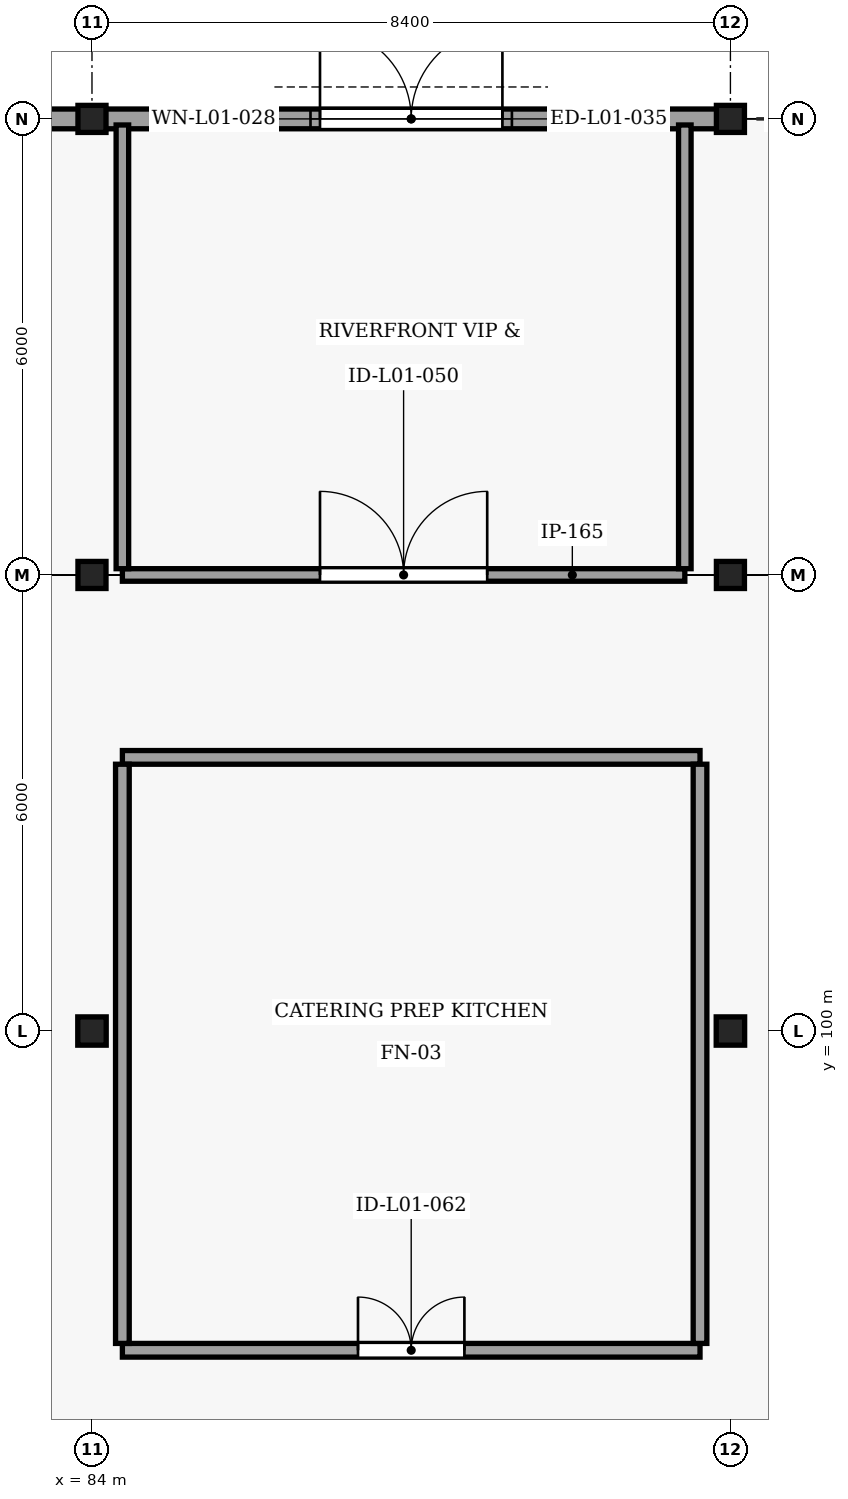
"""IFC4 building model, lengths in metres.
Left out: names, types, materials, properties, quantities, classifications, styles, units other than length and angle.
Written with IfcOpenShell. Run it as: python <this file> out.ifc"""

import sys

from ifc_helpers import new_model, si_unit, direction, frame, frame_2d, origin, origin_2d, place, context, subcontext, project, spatial, rectangle, i_section, extrude, element, fill, save


model = new_model("IFC4")
c1 = context("Model", 3, precision=1e-05, world=origin(), true_north=direction((0.0, 1.0)))
c2 = subcontext(c1, "Body", "Model", "MODEL_VIEW")
j1 = project(units=[si_unit("LENGTHUNIT", "METRE"), si_unit("PLANEANGLEUNIT", "RADIAN")], contexts=[c1])
p1 = place(None, origin())
s1 = spatial("IfcSite", under=j1, at=p1, CompositionType="ELEMENT")
p2 = place(p1, origin())
s2 = spatial("IfcBuilding", under=s1, at=p2, CompositionType="ELEMENT")
p3 = place(p2, origin())
s3 = spatial("IfcBuildingStorey", under=s2, at=p3, CompositionType="ELEMENT", Elevation=0.0)
for number, where, z_axis, x_axis in (
    (1, (84.0, 100.0, -0.45), (0.0, 0.0, 1.0), (1.0, 0.0, 0.0)),
    (2, (92.4, 100.0, -0.45), (0.0, 0.0, 1.0), (1.0, 0.0, 0.0)),
):
    element("IfcColumn", number, at=place(p3, frame(where, z_axis=z_axis, x_axis=x_axis)), inside=s3, PredefinedType="COLUMN", context=c2, shape_type="SweptSolid", body=[
        extrude(i_section(OverallWidth=0.374, OverallDepth=0.372, WebThickness=0.016, FlangeThickness=0.026, FilletRadius=0.016, at=origin_2d()), origin(), (0.0, 0.0, 1.0), 5.57),
    ])
for number, where, z_axis, x_axis in (
    (3, (84.0, 106.0, -0.45), (0.0, 0.0, 1.0), (1.0, 0.0, 0.0)),
    (4, (92.4, 106.0, -0.45), (0.0, 0.0, 1.0), (1.0, 0.0, 0.0)),
    (5, (84.0, 112.0, -0.45), (0.0, 0.0, 1.0), (1.0, 0.0, 0.0)),
    (6, (92.4, 112.0, -0.45), (0.0, 0.0, 1.0), (1.0, 0.0, 0.0)),
):
    element("IfcColumn", number, at=place(p3, frame(where, z_axis=z_axis, x_axis=x_axis)), inside=s3, PredefinedType="COLUMN", context=c2, shape_type="SweptSolid", body=[
        extrude(i_section(OverallWidth=0.369, OverallDepth=0.356, WebThickness=0.011, FlangeThickness=0.018, FilletRadius=0.015, at=origin_2d()), origin(), (0.0, 0.0, 1.0), 5.57),
    ])
p4 = place(p3, frame((74.163, 112.0, 0.0), z_axis=(0.0, 0.0, 1.0), x_axis=(1.0, 0.0, 0.0)))
e7 = element("IfcWall", 7, at=p4, inside=s3, PredefinedType="SOLIDWALL", context=c2, shape_type="SweptSolid", body=[
    extrude(rectangle(XDim=10.018, YDim=0.26, at=frame_2d((5.009, 0.0))), origin(), (0.0, 0.0, 1.0), 4.658),
])
p5 = place(p4, frame((3.637, 0.0, 0.0)))
e8 = element("IfcOpeningElement", 8, at=p5, cuts=e7, PredefinedType="OPENING", context=c2, shape_type="SweptSolid", body=[
    extrude(rectangle(XDim=2.4, YDim=2.4, at=frame_2d((1.2, 1.2))), frame((0.0, 0.14, 0.0), z_axis=(0.0, -1.0, 0.0), x_axis=(1.0, 0.0, 0.0)), (0.0, 0.0, 1.0), 0.28),
])
p6 = place(p4, frame((3.512, 0.0, 3.2)))
e9 = element("IfcOpeningElement", 9, at=p6, cuts=e7, PredefinedType="OPENING", context=c2, shape_type="SweptSolid", body=[
    extrude(rectangle(XDim=2.65, YDim=0.92, at=frame_2d((1.325, 0.46))), frame((0.0, 0.14, 0.0), z_axis=(0.0, -1.0, 0.0), x_axis=(1.0, 0.0, 0.0)), (0.0, 0.0, 1.0), 0.28),
])
p7 = place(p3, frame((84.169, 112.0, 0.0), z_axis=(0.0, 0.0, 1.0), x_axis=(1.0, 0.0, 0.0)))
e10 = element("IfcWall", 10, at=p7, inside=s3, PredefinedType="SOLIDWALL", context=c2, shape_type="SweptSolid", body=[
    extrude(rectangle(XDim=8.061, YDim=0.26, at=frame_2d((4.031, 0.0))), origin(), (0.0, 0.0, 1.0), 4.658),
])
p8 = place(p7, frame((2.831, 0.0, 0.0)))
e11 = element("IfcOpeningElement", 11, at=p8, cuts=e10, PredefinedType="OPENING", context=c2, shape_type="SweptSolid", body=[
    extrude(rectangle(XDim=2.4, YDim=2.4, at=frame_2d((1.2, 1.2))), frame((0.0, 0.14, 0.0), z_axis=(0.0, -1.0, 0.0), x_axis=(1.0, 0.0, 0.0)), (0.0, 0.0, 1.0), 0.28),
])
p9 = place(p7, frame((2.706, 0.0, 3.2)))
e12 = element("IfcOpeningElement", 12, at=p9, cuts=e10, PredefinedType="OPENING", context=c2, shape_type="SweptSolid", body=[
    extrude(rectangle(XDim=2.65, YDim=0.92, at=frame_2d((1.325, 0.46))), frame((0.0, 0.14, 0.0), z_axis=(0.0, -1.0, 0.0), x_axis=(1.0, 0.0, 0.0)), (0.0, 0.0, 1.0), 0.28),
])
p10 = place(p3, frame((84.4, 106.0, 0.0), z_axis=(0.0, 0.0, 1.0), x_axis=(1.0, 0.0, 0.0)))
e13 = element("IfcWall", 13, at=p10, inside=s3, PredefinedType="PARTITIONING", context=c2, shape_type="SweptSolid", body=[
    extrude(rectangle(XDim=7.4, YDim=0.165, at=frame_2d((3.7, 0.0))), origin(), (0.0, 0.0, 1.0), 4.66),
])
p11 = place(p10, frame((2.6, 0.0, 0.0)))
e14 = element("IfcOpeningElement", 14, at=p11, cuts=e13, PredefinedType="OPENING", context=c2, shape_type="SweptSolid", body=[
    extrude(rectangle(XDim=2.2, YDim=2.45, at=frame_2d((1.1, 1.225))), frame((0.0, 0.093, 0.0), z_axis=(0.0, -1.0, 0.0), x_axis=(1.0, 0.0, 0.0)), (0.0, 0.0, 1.0), 0.185),
])
for number, where, z_axis, x_axis in (
    (15, (84.4, 106.083, 0.0), (0.0, 0.0, 1.0), (0.0, 1.0, 0.0)),
    (16, (91.8, 106.083, 0.0), (0.0, 0.0, 1.0), (0.0, 1.0, 0.0)),
):
    element("IfcWall", number, at=place(p3, frame(where, z_axis=z_axis, x_axis=x_axis)), inside=s3, PredefinedType="PARTITIONING", context=c2, shape_type="SweptSolid", body=[
        extrude(rectangle(XDim=5.837, YDim=0.165, at=frame_2d((2.919, 0.0))), origin(), (0.0, 0.0, 1.0), 4.807),
    ])
p12 = place(p3, frame((84.4, 95.8, 0.0), z_axis=(0.0, 0.0, 1.0), x_axis=(1.0, 0.0, 0.0)))
e17 = element("IfcWall", 17, at=p12, inside=s3, PredefinedType="SOLIDWALL", context=c2, shape_type="SweptSolid", body=[
    extrude(rectangle(XDim=7.6, YDim=0.18, at=frame_2d((3.8, 0.0))), origin(), (0.0, 0.0, 1.0), 5.1),
])
p13 = place(p12, frame((3.1, 0.0, 0.0)))
e18 = element("IfcOpeningElement", 18, at=p13, cuts=e17, PredefinedType="OPENING", context=c2, shape_type="SweptSolid", body=[
    extrude(rectangle(XDim=1.4, YDim=2.2, at=frame_2d((0.7, 1.1))), frame((0.0, 0.1, 0.0), z_axis=(0.0, -1.0, 0.0), x_axis=(1.0, 0.0, 0.0)), (0.0, 0.0, 1.0), 0.2),
])
p14 = place(p3, frame((84.4, 103.6, 0.0), z_axis=(0.0, 0.0, 1.0), x_axis=(1.0, 0.0, 0.0)))
e19 = element("IfcWall", 19, at=p14, inside=s3, PredefinedType="SOLIDWALL", context=c2, shape_type="SweptSolid", body=[
    extrude(rectangle(XDim=7.6, YDim=0.18, at=frame_2d((3.8, 0.0))), origin(), (0.0, 0.0, 1.0), 5.1),
])
for number, where, z_axis, x_axis in (
    (20, (84.4, 95.89, 0.0), (0.0, 0.0, 1.0), (0.0, 1.0, 0.0)),
    (21, (92.0, 95.89, 0.0), (0.0, 0.0, 1.0), (0.0, 1.0, 0.0)),
):
    element("IfcWall", number, at=place(p3, frame(where, z_axis=z_axis, x_axis=x_axis)), inside=s3, PredefinedType="SOLIDWALL", context=c2, shape_type="SweptSolid", body=[
        extrude(rectangle(XDim=7.62, YDim=0.18, at=frame_2d((3.81, 0.0))), origin(), (0.0, 0.0, 1.0), 4.66),
    ])
p15 = place(p8, origin())
e22 = element("IfcDoor", 22, at=p15, inside=s3, OperationType="DOUBLE_DOOR_SINGLE_SWING", PredefinedType="DOOR", context=c2, shape_type="SweptSolid", body=[
    extrude(rectangle(XDim=2.4, YDim=2.4, at=frame_2d((1.2, 1.2))), frame((0.0, 0.025, 0.0), z_axis=(0.0, -1.0, 0.0), x_axis=(1.0, 0.0, 0.0)), (0.0, 0.0, 1.0), 0.05),
])
fill(e11, e22)
p16 = place(p9, origin())
e23 = element("IfcWindow", 23, at=p16, inside=s3, PartitioningType="SINGLE_PANEL", PredefinedType="WINDOW", context=c2, shape_type="SweptSolid", body=[
    extrude(rectangle(XDim=2.65, YDim=0.92, at=frame_2d((1.325, 0.46))), frame((0.0, 0.03, 0.0), z_axis=(0.0, -1.0, 0.0), x_axis=(1.0, 0.0, 0.0)), (0.0, 0.0, 1.0), 0.06),
])
fill(e12, e23)
p17 = place(p11, origin())
e24 = element("IfcDoor", 24, at=p17, inside=s3, OperationType="DOUBLE_DOOR_SINGLE_SWING", PredefinedType="DOOR", context=c2, shape_type="SweptSolid", body=[
    extrude(rectangle(XDim=2.2, YDim=2.45, at=frame_2d((1.1, 1.225))), frame((0.0, 0.025, 0.0), z_axis=(0.0, -1.0, 0.0), x_axis=(1.0, 0.0, 0.0)), (0.0, 0.0, 1.0), 0.05),
])
fill(e14, e24)
p18 = place(p13, origin())
e25 = element("IfcDoor", 25, at=p18, inside=s3, OperationType="DOUBLE_DOOR_DOUBLE_SWING", PredefinedType="DOOR", context=c2, shape_type="SweptSolid", body=[
    extrude(rectangle(XDim=1.4, YDim=2.2, at=frame_2d((0.7, 1.1))), frame((0.0, 0.025, 0.0), z_axis=(0.0, -1.0, 0.0), x_axis=(1.0, 0.0, 0.0)), (0.0, 0.0, 1.0), 0.05),
])
fill(e18, e25)
save(model, sys.argv[1])
